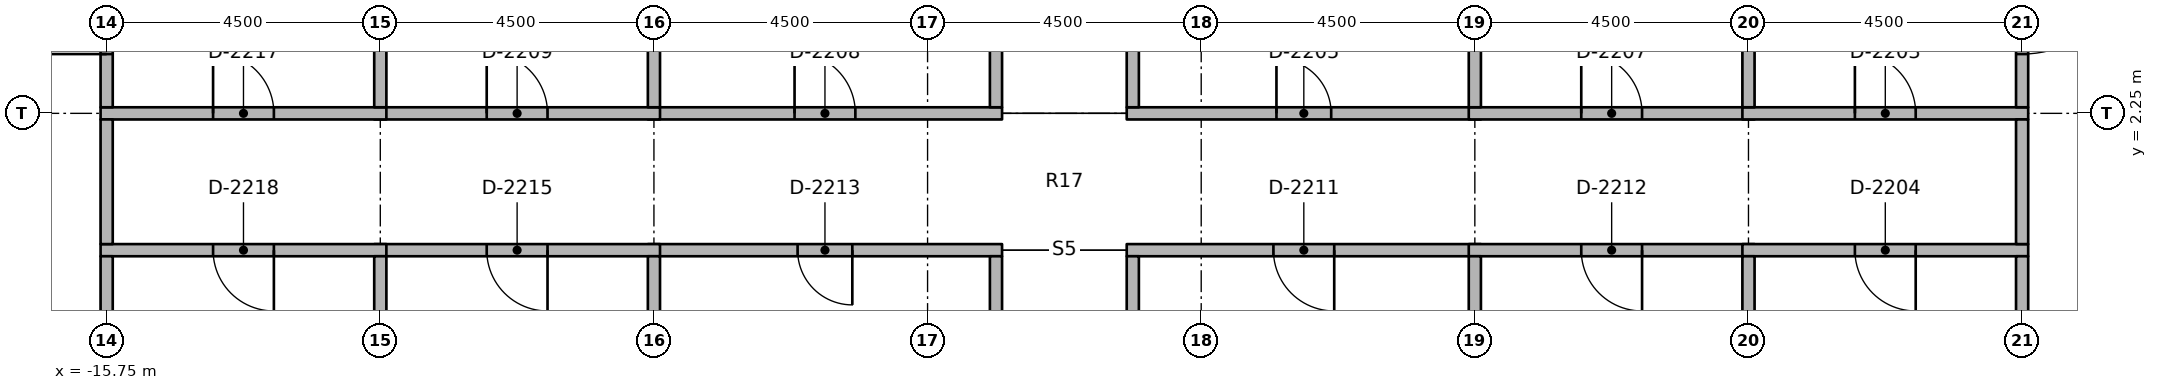
"""IFC4 building model, lengths in metres.
Left out: names, types, materials, properties, quantities, classifications, styles, units other than length and angle.
Written with IfcOpenShell. Run it as: python <this file> out.ifc"""

import sys

from ifc_helpers import new_model, si_unit, direction, frame, frame_2d, origin, place, context, subcontext, project, spatial, rectangle, extrude, element, fill, save


model = new_model("IFC4")
c1 = context("Model", 3, precision=1e-05, world=origin(), true_north=direction((0.0, 1.0)))
c2 = subcontext(c1, "Body", "Model", "MODEL_VIEW")
j1 = project(units=[si_unit("LENGTHUNIT", "METRE"), si_unit("PLANEANGLEUNIT", "RADIAN")], contexts=[c1])
p1 = place(None, origin())
s1 = spatial("IfcSite", under=j1, at=p1, CompositionType="ELEMENT")
p2 = place(p1, origin())
s2 = spatial("IfcBuilding", under=s1, at=p2, CompositionType="ELEMENT")
p3 = place(p2, frame((0.0, 0.0, 206.8)))
s3 = spatial("IfcBuildingStorey", under=s2, at=p3, CompositionType="ELEMENT", Elevation=206.8)
p4 = place(p3, frame((1.025, 2.25, 0.0), z_axis=(0.0, 0.0, 1.0), x_axis=(1.0, 0.0, 0.0)))
e1 = element("IfcWall", 1, at=p4, inside=s3, PredefinedType="PARTITIONING", context=c2, shape_type="SweptSolid", body=[
    extrude(rectangle(XDim=5.825, YDim=0.2, at=frame_2d((2.913, 0.0))), origin(), (0.0, 0.0, 1.0), 2.75),
])
p5 = place(p4, frame((2.462, 0.0, 0.0)))
e2 = element("IfcOpeningElement", 2, at=p5, cuts=e1, PredefinedType="OPENING", context=c2, shape_type="SweptSolid", body=[
    extrude(rectangle(XDim=0.9, YDim=2.1, at=frame_2d((0.45, 1.05))), frame((0.0, 0.11, 0.0), z_axis=(0.0, -1.0, 0.0), x_axis=(1.0, 0.0, 0.0)), (0.0, 0.0, 1.0), 0.22),
])
p6 = place(p3, frame((6.65, 2.25, 0.0), z_axis=(0.0, 0.0, 1.0), x_axis=(1.0, 0.0, 0.0)))
e3 = element("IfcWall", 3, at=p6, inside=s3, PredefinedType="PARTITIONING", context=c2, shape_type="SweptSolid", body=[
    extrude(rectangle(XDim=4.7, YDim=0.2, at=frame_2d((2.35, 0.0))), origin(), (0.0, 0.0, 1.0), 2.75),
])
p7 = place(p6, frame((1.85, 0.0, 0.0)))
e4 = element("IfcOpeningElement", 4, at=p7, cuts=e3, PredefinedType="OPENING", context=c2, shape_type="SweptSolid", body=[
    extrude(rectangle(XDim=1.0, YDim=2.1, at=frame_2d((0.5, 1.05))), frame((0.0, 0.11, 0.0), z_axis=(0.0, -1.0, 0.0), x_axis=(1.0, 0.0, 0.0)), (0.0, 0.0, 1.0), 0.22),
])
p8 = place(p3, frame((-6.85, 2.25, 0.0), z_axis=(0.0, 0.0, 1.0), x_axis=(1.0, 0.0, 0.0)))
e5 = element("IfcWall", 5, at=p8, inside=s3, PredefinedType="PARTITIONING", context=c2, shape_type="SweptSolid", body=[
    extrude(rectangle(XDim=5.825, YDim=0.2, at=frame_2d((2.913, 0.0))), origin(), (0.0, 0.0, 1.0), 2.75),
])
p9 = place(p8, frame((2.413, 0.0, 0.0)))
e6 = element("IfcOpeningElement", 6, at=p9, cuts=e5, PredefinedType="OPENING", context=c2, shape_type="SweptSolid", body=[
    extrude(rectangle(XDim=1.0, YDim=2.1, at=frame_2d((0.5, 1.05))), frame((0.0, 0.11, 0.0), z_axis=(0.0, -1.0, 0.0), x_axis=(1.0, 0.0, 0.0)), (0.0, 0.0, 1.0), 0.22),
])
p10 = place(p3, frame((-11.35, 2.25, 0.0), z_axis=(0.0, 0.0, 1.0), x_axis=(1.0, 0.0, 0.0)))
e7 = element("IfcWall", 7, at=p10, inside=s3, PredefinedType="PARTITIONING", context=c2, shape_type="SweptSolid", body=[
    extrude(rectangle(XDim=4.7, YDim=0.2, at=frame_2d((2.35, 0.0))), origin(), (0.0, 0.0, 1.0), 2.75),
])
p11 = place(p10, frame((1.85, 0.0, 0.0)))
e8 = element("IfcOpeningElement", 8, at=p11, cuts=e7, PredefinedType="OPENING", context=c2, shape_type="SweptSolid", body=[
    extrude(rectangle(XDim=1.0, YDim=2.1, at=frame_2d((0.5, 1.05))), frame((0.0, 0.11, 0.0), z_axis=(0.0, -1.0, 0.0), x_axis=(1.0, 0.0, 0.0)), (0.0, 0.0, 1.0), 0.22),
])
p12 = place(p3, frame((6.85, 0.0, 0.0), z_axis=(0.0, 0.0, 1.0), x_axis=(-1.0, 0.0, 0.0)))
e9 = element("IfcWall", 9, at=p12, inside=s3, PredefinedType="PARTITIONING", context=c2, shape_type="SweptSolid", body=[
    extrude(rectangle(XDim=5.825, YDim=0.2, at=frame_2d((2.913, 0.0))), origin(), (0.0, 0.0, 1.0), 2.75),
])
p13 = place(p12, frame((2.413, 0.0, 0.0)))
e10 = element("IfcOpeningElement", 10, at=p13, cuts=e9, PredefinedType="OPENING", context=c2, shape_type="SweptSolid", body=[
    extrude(rectangle(XDim=1.0, YDim=2.1, at=frame_2d((0.5, 1.05))), frame((0.0, 0.11, 0.0), z_axis=(0.0, -1.0, 0.0), x_axis=(1.0, 0.0, 0.0)), (0.0, 0.0, 1.0), 0.22),
])
p14 = place(p3, frame((11.35, 0.0, 0.0), z_axis=(0.0, 0.0, 1.0), x_axis=(-1.0, 0.0, 0.0)))
e11 = element("IfcWall", 11, at=p14, inside=s3, PredefinedType="PARTITIONING", context=c2, shape_type="SweptSolid", body=[
    extrude(rectangle(XDim=4.7, YDim=0.2, at=frame_2d((2.35, 0.0))), origin(), (0.0, 0.0, 1.0), 2.75),
])
p15 = place(p14, frame((1.85, 0.0, 0.0)))
e12 = element("IfcOpeningElement", 12, at=p15, cuts=e11, PredefinedType="OPENING", context=c2, shape_type="SweptSolid", body=[
    extrude(rectangle(XDim=1.0, YDim=2.1, at=frame_2d((0.5, 1.05))), frame((0.0, 0.11, 0.0), z_axis=(0.0, -1.0, 0.0), x_axis=(1.0, 0.0, 0.0)), (0.0, 0.0, 1.0), 0.22),
])
p16 = place(p3, frame((-1.025, 0.0, 0.0), z_axis=(0.0, 0.0, 1.0), x_axis=(-1.0, 0.0, 0.0)))
e13 = element("IfcWall", 13, at=p16, inside=s3, PredefinedType="PARTITIONING", context=c2, shape_type="SweptSolid", body=[
    extrude(rectangle(XDim=5.825, YDim=0.2, at=frame_2d((2.913, 0.0))), origin(), (0.0, 0.0, 1.0), 2.75),
])
p17 = place(p16, frame((2.462, 0.0, 0.0)))
e14 = element("IfcOpeningElement", 14, at=p17, cuts=e13, PredefinedType="OPENING", context=c2, shape_type="SweptSolid", body=[
    extrude(rectangle(XDim=0.9, YDim=2.1, at=frame_2d((0.45, 1.05))), frame((0.0, 0.11, 0.0), z_axis=(0.0, -1.0, 0.0), x_axis=(1.0, 0.0, 0.0)), (0.0, 0.0, 1.0), 0.22),
])
p18 = place(p3, frame((-6.65, 0.0, 0.0), z_axis=(0.0, 0.0, 1.0), x_axis=(-1.0, 0.0, 0.0)))
e15 = element("IfcWall", 15, at=p18, inside=s3, PredefinedType="PARTITIONING", context=c2, shape_type="SweptSolid", body=[
    extrude(rectangle(XDim=4.7, YDim=0.2, at=frame_2d((2.35, 0.0))), origin(), (0.0, 0.0, 1.0), 2.75),
])
p19 = place(p18, frame((1.85, 0.0, 0.0)))
e16 = element("IfcOpeningElement", 16, at=p19, cuts=e15, PredefinedType="OPENING", context=c2, shape_type="SweptSolid", body=[
    extrude(rectangle(XDim=1.0, YDim=2.1, at=frame_2d((0.5, 1.05))), frame((0.0, 0.11, 0.0), z_axis=(0.0, -1.0, 0.0), x_axis=(1.0, 0.0, 0.0)), (0.0, 0.0, 1.0), 0.22),
])
p20 = place(p3, frame((11.15, 2.25, 0.0), z_axis=(0.0, 0.0, 1.0), x_axis=(1.0, 0.0, 0.0)))
e17 = element("IfcWall", 17, at=p20, inside=s3, PredefinedType="PARTITIONING", context=c2, shape_type="SweptSolid", body=[
    extrude(rectangle(XDim=4.7, YDim=0.2, at=frame_2d((2.35, 0.0))), origin(), (0.0, 0.0, 1.0), 2.75),
])
p21 = place(p20, frame((1.85, 0.0, 0.0)))
e18 = element("IfcOpeningElement", 18, at=p21, cuts=e17, PredefinedType="OPENING", context=c2, shape_type="SweptSolid", body=[
    extrude(rectangle(XDim=1.0, YDim=2.1, at=frame_2d((0.5, 1.05))), frame((0.0, 0.11, 0.0), z_axis=(0.0, -1.0, 0.0), x_axis=(1.0, 0.0, 0.0)), (0.0, 0.0, 1.0), 0.22),
])
p22 = place(p3, frame((15.85, 0.0, 0.0), z_axis=(0.0, 0.0, 1.0), x_axis=(-1.0, 0.0, 0.0)))
e19 = element("IfcWall", 19, at=p22, inside=s3, PredefinedType="PARTITIONING", context=c2, shape_type="SweptSolid", body=[
    extrude(rectangle(XDim=4.7, YDim=0.2, at=frame_2d((2.35, 0.0))), origin(), (0.0, 0.0, 1.0), 2.75),
])
p23 = place(p22, frame((1.85, 0.0, 0.0)))
e20 = element("IfcOpeningElement", 20, at=p23, cuts=e19, PredefinedType="OPENING", context=c2, shape_type="SweptSolid", body=[
    extrude(rectangle(XDim=1.0, YDim=2.1, at=frame_2d((0.5, 1.05))), frame((0.0, 0.11, 0.0), z_axis=(0.0, -1.0, 0.0), x_axis=(1.0, 0.0, 0.0)), (0.0, 0.0, 1.0), 0.22),
])
p24 = place(p3, frame((15.75, 0.1, 0.0), z_axis=(0.0, 0.0, 1.0), x_axis=(0.0, 1.0, 0.0)))
e21 = element("IfcWall", 21, at=p24, inside=s3, PredefinedType="PARTITIONING", context=c2, shape_type="SweptSolid", body=[
    extrude(rectangle(XDim=2.05, YDim=0.2, at=frame_2d((1.025, 0.0))), origin(), (0.0, 0.0, 1.0), 2.75),
])
p25 = place(p3, frame((-15.85, 2.25, 0.0), z_axis=(0.0, 0.0, 1.0), x_axis=(1.0, 0.0, 0.0)))
e22 = element("IfcWall", 22, at=p25, inside=s3, PredefinedType="PARTITIONING", context=c2, shape_type="SweptSolid", body=[
    extrude(rectangle(XDim=4.7, YDim=0.2, at=frame_2d((2.35, 0.0))), origin(), (0.0, 0.0, 1.0), 2.75),
])
p26 = place(p25, frame((1.85, 0.0, 0.0)))
e23 = element("IfcOpeningElement", 23, at=p26, cuts=e22, PredefinedType="OPENING", context=c2, shape_type="SweptSolid", body=[
    extrude(rectangle(XDim=1.0, YDim=2.1, at=frame_2d((0.5, 1.05))), frame((0.0, 0.11, 0.0), z_axis=(0.0, -1.0, 0.0), x_axis=(1.0, 0.0, 0.0)), (0.0, 0.0, 1.0), 0.22),
])
p27 = place(p3, frame((-11.15, 0.0, 0.0), z_axis=(0.0, 0.0, 1.0), x_axis=(-1.0, 0.0, 0.0)))
e24 = element("IfcWall", 24, at=p27, inside=s3, PredefinedType="PARTITIONING", context=c2, shape_type="SweptSolid", body=[
    extrude(rectangle(XDim=4.7, YDim=0.2, at=frame_2d((2.35, 0.0))), origin(), (0.0, 0.0, 1.0), 2.75),
])
p28 = place(p27, frame((1.85, 0.0, 0.0)))
e25 = element("IfcOpeningElement", 25, at=p28, cuts=e24, PredefinedType="OPENING", context=c2, shape_type="SweptSolid", body=[
    extrude(rectangle(XDim=1.0, YDim=2.1, at=frame_2d((0.5, 1.05))), frame((0.0, 0.11, 0.0), z_axis=(0.0, -1.0, 0.0), x_axis=(1.0, 0.0, 0.0)), (0.0, 0.0, 1.0), 0.22),
])
for number, where, z_axis, x_axis in (
    (26, (-15.75, 0.1, 0.0), (0.0, 0.0, 1.0), (0.0, 1.0, 0.0)),
    (27, (1.125, 2.35, 0.0), (0.0, 0.0, 1.0), (0.0, 1.0, 0.0)),
):
    element("IfcWall", number, at=place(p3, frame(where, z_axis=z_axis, x_axis=x_axis)), inside=s3, PredefinedType="PARTITIONING", context=c2, shape_type="SweptSolid", body=[
        extrude(rectangle(XDim=2.05, YDim=0.2, at=frame_2d((1.025, 0.0))), origin(), (0.0, 0.0, 1.0), 2.75),
    ])
p29 = place(p3, frame((-1.125, 2.35, 0.0), z_axis=(0.0, 0.0, 1.0), x_axis=(0.0, 1.0, 0.0)))
e28 = element("IfcWall", 28, at=p29, inside=s3, PredefinedType="PARTITIONING", context=c2, shape_type="SweptSolid", body=[
    extrude(rectangle(XDim=4.3, YDim=0.2, at=frame_2d((2.15, 0.0))), origin(), (0.0, 0.0, 1.0), 2.75),
])
p30 = place(p3, frame((1.125, -6.65, 0.0), z_axis=(0.0, 0.0, 1.0), x_axis=(0.0, 1.0, 0.0)))
e29 = element("IfcWall", 29, at=p30, inside=s3, PredefinedType="PARTITIONING", context=c2, shape_type="SweptSolid", body=[
    extrude(rectangle(XDim=6.55, YDim=0.2, at=frame_2d((3.275, 0.0))), origin(), (0.0, 0.0, 1.0), 2.75),
])
p31 = place(p3, frame((-1.125, -3.4, 0.0), z_axis=(0.0, 0.0, 1.0), x_axis=(0.0, 1.0, 0.0)))
e30 = element("IfcWall", 30, at=p31, inside=s3, PredefinedType="PARTITIONING", context=c2, shape_type="SweptSolid", body=[
    extrude(rectangle(XDim=3.3, YDim=0.2, at=frame_2d((1.65, 0.0))), origin(), (0.0, 0.0, 1.0), 2.75),
])
p32 = place(p3, frame((6.75, 2.35, 0.0), z_axis=(0.0, 0.0, 1.0), x_axis=(0.0, 1.0, 0.0)))
e31 = element("IfcWall", 31, at=p32, inside=s3, PredefinedType="PARTITIONING", context=c2, shape_type="SweptSolid", body=[
    extrude(rectangle(XDim=2.05, YDim=0.2, at=frame_2d((1.025, 0.0))), origin(), (0.0, 0.0, 1.0), 2.75),
])
p33 = place(p3, frame((11.25, 2.35, 0.0), z_axis=(0.0, 0.0, 1.0), x_axis=(0.0, 1.0, 0.0)))
e32 = element("IfcWall", 32, at=p33, inside=s3, PredefinedType="PARTITIONING", context=c2, shape_type="SweptSolid", body=[
    extrude(rectangle(XDim=3.82, YDim=0.2, at=frame_2d((1.91, 0.0))), origin(), (0.0, 0.0, 1.0), 2.75),
])
for number, where, z_axis, x_axis in (
    (33, (-6.75, 2.35, 0.0), (0.0, 0.0, 1.0), (0.0, 1.0, 0.0)),
    (34, (-11.25, 2.35, 0.0), (0.0, 0.0, 1.0), (0.0, 1.0, 0.0)),
):
    element("IfcWall", number, at=place(p3, frame(where, z_axis=z_axis, x_axis=x_axis)), inside=s3, PredefinedType="PARTITIONING", context=c2, shape_type="SweptSolid", body=[
        extrude(rectangle(XDim=4.3, YDim=0.2, at=frame_2d((2.15, 0.0))), origin(), (0.0, 0.0, 1.0), 2.75),
    ])
p34 = place(p3, frame((6.75, -6.65, 0.0), z_axis=(0.0, 0.0, 1.0), x_axis=(0.0, 1.0, 0.0)))
e35 = element("IfcWall", 35, at=p34, inside=s3, PredefinedType="PARTITIONING", context=c2, shape_type="SweptSolid", body=[
    extrude(rectangle(XDim=6.55, YDim=0.2, at=frame_2d((3.275, 0.0))), origin(), (0.0, 0.0, 1.0), 2.75),
])
p35 = place(p3, frame((11.25, -6.17, 0.0), z_axis=(0.0, 0.0, 1.0), x_axis=(0.0, 1.0, 0.0)))
e36 = element("IfcWall", 36, at=p35, inside=s3, PredefinedType="PARTITIONING", context=c2, shape_type="SweptSolid", body=[
    extrude(rectangle(XDim=6.07, YDim=0.2, at=frame_2d((3.035, 0.0))), origin(), (0.0, 0.0, 1.0), 2.75),
])
p36 = place(p3, frame((-6.75, -3.4, 0.0), z_axis=(0.0, 0.0, 1.0), x_axis=(0.0, 1.0, 0.0)))
e37 = element("IfcWall", 37, at=p36, inside=s3, PredefinedType="PARTITIONING", context=c2, shape_type="SweptSolid", body=[
    extrude(rectangle(XDim=3.3, YDim=0.2, at=frame_2d((1.65, 0.0))), origin(), (0.0, 0.0, 1.0), 2.75),
])
p37 = place(p3, frame((-11.25, -6.17, 0.0), z_axis=(0.0, 0.0, 1.0), x_axis=(0.0, 1.0, 0.0)))
e38 = element("IfcWall", 38, at=p37, inside=s3, PredefinedType="PARTITIONING", context=c2, shape_type="SweptSolid", body=[
    extrude(rectangle(XDim=6.07, YDim=0.2, at=frame_2d((3.035, 0.0))), origin(), (0.0, 0.0, 1.0), 2.75),
])
p38 = place(p3, frame((15.75, 5.9, 0.0), z_axis=(0.0, 0.0, 1.0), x_axis=(0.0, -1.0, 0.0)))
e39 = element("IfcWall", 39, at=p38, inside=s3, PredefinedType="PARTITIONING", context=c2, shape_type="SweptSolid", body=[
    extrude(rectangle(XDim=3.55, YDim=0.2, at=frame_2d((1.775, 0.0))), origin(), (0.0, 0.0, 1.0), 2.75),
])
p39 = place(p38, frame((0.875, 0.0, 0.0)))
e40 = element("IfcOpeningElement", 40, at=p39, cuts=e39, PredefinedType="OPENING", context=c2, shape_type="SweptSolid", body=[
    extrude(rectangle(XDim=1.8, YDim=2.1, at=frame_2d((0.9, 1.05))), frame((0.0, 0.11, 0.0), z_axis=(0.0, -1.0, 0.0), x_axis=(1.0, 0.0, 0.0)), (0.0, 0.0, 1.0), 0.22),
])
p40 = place(p3, frame((15.75, -5.9, 0.0), z_axis=(0.0, 0.0, 1.0), x_axis=(0.0, 1.0, 0.0)))
e41 = element("IfcWall", 41, at=p40, inside=s3, PredefinedType="PARTITIONING", context=c2, shape_type="SweptSolid", body=[
    extrude(rectangle(XDim=5.8, YDim=0.2, at=frame_2d((2.9, 0.0))), origin(), (0.0, 0.0, 1.0), 2.75),
])
p41 = place(p3, frame((-15.75, 2.35, 0.0), z_axis=(0.0, 0.0, 1.0), x_axis=(0.0, 1.0, 0.0)))
e42 = element("IfcWall", 42, at=p41, inside=s3, PredefinedType="PARTITIONING", context=c2, shape_type="SweptSolid", body=[
    extrude(rectangle(XDim=3.55, YDim=0.2, at=frame_2d((1.775, 0.0))), origin(), (0.0, 0.0, 1.0), 2.75),
])
p42 = place(p41, frame((0.875, 0.0, 0.0)))
e43 = element("IfcOpeningElement", 43, at=p42, cuts=e42, PredefinedType="OPENING", context=c2, shape_type="SweptSolid", body=[
    extrude(rectangle(XDim=1.8, YDim=2.1, at=frame_2d((0.9, 1.05))), frame((0.0, 0.11, 0.0), z_axis=(0.0, -1.0, 0.0), x_axis=(1.0, 0.0, 0.0)), (0.0, 0.0, 1.0), 0.22),
])
p43 = place(p3, frame((-15.75, -5.9, 0.0), z_axis=(0.0, 0.0, 1.0), x_axis=(0.0, 1.0, 0.0)))
e44 = element("IfcWall", 44, at=p43, inside=s3, PredefinedType="PARTITIONING", context=c2, shape_type="SweptSolid", body=[
    extrude(rectangle(XDim=5.8, YDim=0.2, at=frame_2d((2.9, 0.0))), origin(), (0.0, 0.0, 1.0), 2.75),
])
p44 = place(p39, origin())
e45 = element("IfcDoor", 45, at=p44, inside=s3, OperationType="DOUBLE_DOOR_SINGLE_SWING", PredefinedType="DOOR", context=c2, shape_type="SweptSolid", body=[
    extrude(rectangle(XDim=1.8, YDim=2.1, at=frame_2d((0.9, 1.05))), frame((0.0, 0.025, 0.0), z_axis=(0.0, -1.0, 0.0), x_axis=(1.0, 0.0, 0.0)), (0.0, 0.0, 1.0), 0.05),
])
fill(e40, e45)
p45 = place(p21, origin())
e46 = element("IfcDoor", 46, at=p45, inside=s3, OperationType="SINGLE_SWING_RIGHT", PredefinedType="DOOR", context=c2, shape_type="SweptSolid", body=[
    extrude(rectangle(XDim=1.0, YDim=2.1, at=frame_2d((0.5, 1.05))), frame((0.0, 0.025, 0.0), z_axis=(0.0, -1.0, 0.0), x_axis=(1.0, 0.0, 0.0)), (0.0, 0.0, 1.0), 0.05),
])
fill(e18, e46)
p46 = place(p23, origin())
e47 = element("IfcDoor", 47, at=p46, inside=s3, OperationType="SINGLE_SWING_RIGHT", PredefinedType="DOOR", context=c2, shape_type="SweptSolid", body=[
    extrude(rectangle(XDim=1.0, YDim=2.1, at=frame_2d((0.5, 1.05))), frame((0.0, 0.025, 0.0), z_axis=(0.0, -1.0, 0.0), x_axis=(1.0, 0.0, 0.0)), (0.0, 0.0, 1.0), 0.05),
])
fill(e20, e47)
p47 = place(p5, origin())
e48 = element("IfcDoor", 48, at=p47, inside=s3, OperationType="SINGLE_SWING_RIGHT", PredefinedType="DOOR", context=c2, shape_type="SweptSolid", body=[
    extrude(rectangle(XDim=0.9, YDim=2.1, at=frame_2d((0.45, 1.05))), frame((0.0, 0.025, 0.0), z_axis=(0.0, -1.0, 0.0), x_axis=(1.0, 0.0, 0.0)), (0.0, 0.0, 1.0), 0.05),
])
fill(e2, e48)
p48 = place(p7, origin())
e49 = element("IfcDoor", 49, at=p48, inside=s3, OperationType="SINGLE_SWING_RIGHT", PredefinedType="DOOR", context=c2, shape_type="SweptSolid", body=[
    extrude(rectangle(XDim=1.0, YDim=2.1, at=frame_2d((0.5, 1.05))), frame((0.0, 0.025, 0.0), z_axis=(0.0, -1.0, 0.0), x_axis=(1.0, 0.0, 0.0)), (0.0, 0.0, 1.0), 0.05),
])
fill(e4, e49)
p49 = place(p9, origin())
e50 = element("IfcDoor", 50, at=p49, inside=s3, OperationType="SINGLE_SWING_RIGHT", PredefinedType="DOOR", context=c2, shape_type="SweptSolid", body=[
    extrude(rectangle(XDim=1.0, YDim=2.1, at=frame_2d((0.5, 1.05))), frame((0.0, 0.025, 0.0), z_axis=(0.0, -1.0, 0.0), x_axis=(1.0, 0.0, 0.0)), (0.0, 0.0, 1.0), 0.05),
])
fill(e6, e50)
p50 = place(p11, origin())
e51 = element("IfcDoor", 51, at=p50, inside=s3, OperationType="SINGLE_SWING_RIGHT", PredefinedType="DOOR", context=c2, shape_type="SweptSolid", body=[
    extrude(rectangle(XDim=1.0, YDim=2.1, at=frame_2d((0.5, 1.05))), frame((0.0, 0.025, 0.0), z_axis=(0.0, -1.0, 0.0), x_axis=(1.0, 0.0, 0.0)), (0.0, 0.0, 1.0), 0.05),
])
fill(e8, e51)
p51 = place(p13, origin())
e52 = element("IfcDoor", 52, at=p51, inside=s3, OperationType="SINGLE_SWING_RIGHT", PredefinedType="DOOR", context=c2, shape_type="SweptSolid", body=[
    extrude(rectangle(XDim=1.0, YDim=2.1, at=frame_2d((0.5, 1.05))), frame((0.0, 0.025, 0.0), z_axis=(0.0, -1.0, 0.0), x_axis=(1.0, 0.0, 0.0)), (0.0, 0.0, 1.0), 0.05),
])
fill(e10, e52)
p52 = place(p15, origin())
e53 = element("IfcDoor", 53, at=p52, inside=s3, OperationType="SINGLE_SWING_RIGHT", PredefinedType="DOOR", context=c2, shape_type="SweptSolid", body=[
    extrude(rectangle(XDim=1.0, YDim=2.1, at=frame_2d((0.5, 1.05))), frame((0.0, 0.025, 0.0), z_axis=(0.0, -1.0, 0.0), x_axis=(1.0, 0.0, 0.0)), (0.0, 0.0, 1.0), 0.05),
])
fill(e12, e53)
p53 = place(p17, origin())
e54 = element("IfcDoor", 54, at=p53, inside=s3, OperationType="SINGLE_SWING_RIGHT", PredefinedType="DOOR", context=c2, shape_type="SweptSolid", body=[
    extrude(rectangle(XDim=0.9, YDim=2.1, at=frame_2d((0.45, 1.05))), frame((0.0, 0.025, 0.0), z_axis=(0.0, -1.0, 0.0), x_axis=(1.0, 0.0, 0.0)), (0.0, 0.0, 1.0), 0.05),
])
fill(e14, e54)
p54 = place(p19, origin())
e55 = element("IfcDoor", 55, at=p54, inside=s3, OperationType="SINGLE_SWING_RIGHT", PredefinedType="DOOR", context=c2, shape_type="SweptSolid", body=[
    extrude(rectangle(XDim=1.0, YDim=2.1, at=frame_2d((0.5, 1.05))), frame((0.0, 0.025, 0.0), z_axis=(0.0, -1.0, 0.0), x_axis=(1.0, 0.0, 0.0)), (0.0, 0.0, 1.0), 0.05),
])
fill(e16, e55)
p55 = place(p42, origin())
e56 = element("IfcDoor", 56, at=p55, inside=s3, OperationType="DOUBLE_DOOR_SINGLE_SWING", PredefinedType="DOOR", context=c2, shape_type="SweptSolid", body=[
    extrude(rectangle(XDim=1.8, YDim=2.1, at=frame_2d((0.9, 1.05))), frame((0.0, 0.025, 0.0), z_axis=(0.0, -1.0, 0.0), x_axis=(1.0, 0.0, 0.0)), (0.0, 0.0, 1.0), 0.05),
])
fill(e43, e56)
p56 = place(p26, origin())
e57 = element("IfcDoor", 57, at=p56, inside=s3, OperationType="SINGLE_SWING_RIGHT", PredefinedType="DOOR", context=c2, shape_type="SweptSolid", body=[
    extrude(rectangle(XDim=1.0, YDim=2.1, at=frame_2d((0.5, 1.05))), frame((0.0, 0.025, 0.0), z_axis=(0.0, -1.0, 0.0), x_axis=(1.0, 0.0, 0.0)), (0.0, 0.0, 1.0), 0.05),
])
fill(e23, e57)
p57 = place(p28, origin())
e58 = element("IfcDoor", 58, at=p57, inside=s3, OperationType="SINGLE_SWING_RIGHT", PredefinedType="DOOR", context=c2, shape_type="SweptSolid", body=[
    extrude(rectangle(XDim=1.0, YDim=2.1, at=frame_2d((0.5, 1.05))), frame((0.0, 0.025, 0.0), z_axis=(0.0, -1.0, 0.0), x_axis=(1.0, 0.0, 0.0)), (0.0, 0.0, 1.0), 0.05),
])
fill(e25, e58)
save(model, sys.argv[1])
